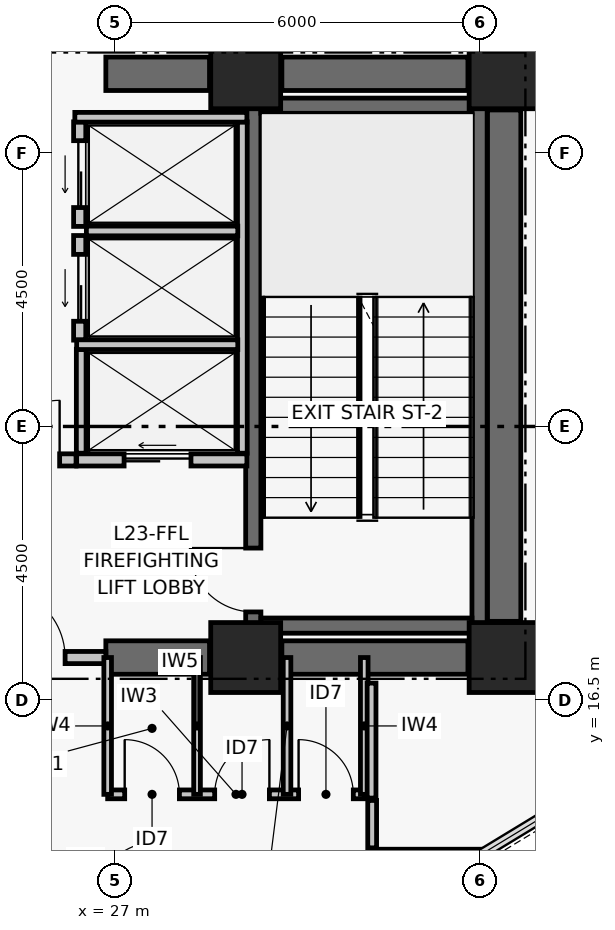
"""IFC4 building model, lengths in metres.
Left out: names, types, materials, properties, quantities, classifications, styles, units other than length and angle.
Written with IfcOpenShell. Run it as: python <this file> out.ifc"""

import sys

from ifc_helpers import new_model, si_unit, direction, frame, frame_2d, origin, origin_2d, place, context, subcontext, project, spatial, rectangle, extrude, element, fill, save


model = new_model("IFC4")
c1 = context("Model", 3, precision=1e-05, world=origin(), true_north=direction((0.0, 1.0)))
c2 = subcontext(c1, "Body", "Model", "MODEL_VIEW")
j1 = project(units=[si_unit("LENGTHUNIT", "METRE"), si_unit("PLANEANGLEUNIT", "RADIAN")], contexts=[c1])
p1 = place(None, origin())
s1 = spatial("IfcSite", under=j1, at=p1, CompositionType="ELEMENT")
p2 = place(p1, origin())
s2 = spatial("IfcBuilding", under=s1, at=p2, CompositionType="ELEMENT")
p3 = place(p2, frame((0.0, 0.0, 96.54)))
s3 = spatial("IfcBuildingStorey", under=s2, at=p3, CompositionType="ELEMENT", Elevation=96.54)
for number, where, z_axis, x_axis in (
    (1, (29.15, 17.2, 0.0), (0.0, 0.0, 1.0), (1.0, 0.0, 0.0)),
    (2, (33.4, 17.2, 0.0), (0.0, 0.0, 1.0), (1.0, 0.0, 0.0)),
    (3, (29.15, 26.8, 0.0), (0.0, 0.0, 1.0), (1.0, 0.0, 0.0)),
    (4, (33.4, 26.8, 0.0), (0.0, 0.0, 1.0), (1.0, 0.0, 0.0)),
):
    element("IfcColumn", number, at=place(p3, frame(where, z_axis=z_axis, x_axis=x_axis)), inside=s3, PredefinedType="COLUMN", context=c2, shape_type="SweptSolid", body=[
        extrude(rectangle(XDim=1.15, YDim=1.15, at=origin_2d()), origin(), (0.0, 0.0, 1.0), 3.72),
    ])
p4 = place(p3, frame((26.85, 17.2, 0.0), z_axis=(0.0, 0.0, 1.0), x_axis=(1.0, 0.0, 0.0)))
e5 = element("IfcWall", 5, at=p4, inside=s3, PredefinedType="SHEAR", context=c2, shape_type="SweptSolid", body=[
    extrude(rectangle(XDim=1.705, YDim=0.55, at=frame_2d((0.853, 0.0))), origin(), (0.0, 0.0, 1.0), 3.47),
])
p5 = place(p3, frame((29.745, 17.2, 0.0), z_axis=(0.0, 0.0, 1.0), x_axis=(1.0, 0.0, 0.0)))
e6 = element("IfcWall", 6, at=p5, inside=s3, PredefinedType="SHEAR", context=c2, shape_type="SweptSolid", body=[
    extrude(rectangle(XDim=3.06, YDim=0.55, at=frame_2d((1.53, 0.0))), origin(), (0.0, 0.0, 1.0), 3.47),
])
p6 = place(p3, frame((26.85, 26.8, 0.0), z_axis=(0.0, 0.0, 1.0), x_axis=(1.0, 0.0, 0.0)))
e7 = element("IfcWall", 7, at=p6, inside=s3, PredefinedType="SHEAR", context=c2, shape_type="SweptSolid", body=[
    extrude(rectangle(XDim=1.705, YDim=0.55, at=frame_2d((0.853, 0.0))), origin(), (0.0, 0.0, 1.0), 3.47),
])
p7 = place(p3, frame((29.745, 26.8, 0.0), z_axis=(0.0, 0.0, 1.0), x_axis=(1.0, 0.0, 0.0)))
e8 = element("IfcWall", 8, at=p7, inside=s3, PredefinedType="SHEAR", context=c2, shape_type="SweptSolid", body=[
    extrude(rectangle(XDim=3.06, YDim=0.55, at=frame_2d((1.53, 0.0))), origin(), (0.0, 0.0, 1.0), 3.47),
])
p8 = place(p3, frame((33.4, 17.795, 0.0), z_axis=(0.0, 0.0, 1.0), x_axis=(0.0, 1.0, 0.0)))
e9 = element("IfcWall", 9, at=p8, inside=s3, PredefinedType="SHEAR", context=c2, shape_type="SweptSolid", body=[
    extrude(rectangle(XDim=8.41, YDim=0.55, at=frame_2d((4.205, 0.0))), origin(), (0.0, 0.0, 1.0), 3.47),
])
p9 = place(p3, frame((29.275, 17.6, 0.0), z_axis=(0.0, 0.0, 1.0), x_axis=(0.0, 1.0, 0.0)))
e10 = element("IfcWall", 10, at=p9, inside=s3, PredefinedType="SHEAR", context=c2, shape_type="SweptSolid", body=[
    extrude(rectangle(XDim=8.8, YDim=0.25, at=frame_2d((4.4, 0.0))), origin(), (0.0, 0.0, 1.0), 3.47),
])
p10 = place(p9, frame((0.35, 0.0, 0.0)))
e11 = element("IfcOpeningElement", 11, at=p10, cuts=e10, PredefinedType="OPENING", context=c2, shape_type="SweptSolid", body=[
    extrude(rectangle(XDim=1.05, YDim=2.08, at=frame_2d((0.525, 1.04))), frame((0.0, 0.135, 0.0), z_axis=(0.0, -1.0, 0.0), x_axis=(1.0, 0.0, 0.0)), (0.0, 0.0, 1.0), 0.27),
])
p11 = place(p3, frame((32.996, 17.6, 0.0), z_axis=(0.0, 0.0, 1.0), x_axis=(0.0, 1.0, 0.0)))
e12 = element("IfcWall", 12, at=p11, inside=s3, PredefinedType="SHEAR", context=c2, shape_type="SweptSolid", body=[
    extrude(rectangle(XDim=8.8, YDim=0.25, at=frame_2d((4.4, 0.0))), origin(), (0.0, 0.0, 1.0), 3.47),
])
for number, where, z_axis, x_axis in (
    (13, (29.4, 17.725, 0.0), (0.0, 0.0, 1.0), (1.0, 0.0, 0.0)),
    (14, (29.4, 26.275, 0.0), (0.0, 0.0, 1.0), (1.0, 0.0, 0.0)),
):
    element("IfcWall", number, at=place(p3, frame(where, z_axis=z_axis, x_axis=x_axis)), inside=s3, PredefinedType="SHEAR", context=c2, shape_type="SweptSolid", body=[
        extrude(rectangle(XDim=3.471, YDim=0.25, at=frame_2d((1.736, 0.0))), origin(), (0.0, 0.0, 1.0), 3.47),
    ])
p12 = place(p3, frame((24.35, 17.2, 0.0), z_axis=(0.0, 0.0, 1.0), x_axis=(1.0, 0.0, 0.0)))
e15 = element("IfcWall", 15, at=p12, inside=s3, PredefinedType="PARTITIONING", context=c2, shape_type="SweptSolid", body=[
    extrude(rectangle(XDim=2.5, YDim=0.2, at=frame_2d((1.25, 0.0))), origin(), (0.0, 0.0, 1.0), 2.6),
])
p13 = place(p12, frame((0.68, 0.0, 0.0)))
e16 = element("IfcOpeningElement", 16, at=p13, cuts=e15, PredefinedType="OPENING", context=c2, shape_type="SweptSolid", body=[
    extrude(rectangle(XDim=1.15, YDim=2.08, at=frame_2d((0.575, 1.04))), frame((0.0, 0.11, 0.0), z_axis=(0.0, -1.0, 0.0), x_axis=(1.0, 0.0, 0.0)), (0.0, 0.0, 1.0), 0.22),
])
p14 = place(p3, frame((24.84, 20.45, 0.0), z_axis=(0.0, 0.0, 1.0), x_axis=(1.0, 0.0, 0.0)))
e17 = element("IfcWall", 17, at=p14, inside=s3, PredefinedType="PARTITIONING", context=c2, shape_type="SweptSolid", body=[
    extrude(rectangle(XDim=1.52, YDim=0.2, at=frame_2d((0.76, 0.0))), origin(), (0.0, 0.0, 1.0), 3.47),
])
p15 = place(p14, frame((0.27, 0.0, 0.0)))
e18 = element("IfcOpeningElement", 18, at=p15, cuts=e17, PredefinedType="OPENING", context=c2, shape_type="SweptSolid", body=[
    extrude(rectangle(XDim=0.98, YDim=2.06, at=frame_2d((0.49, 1.03))), frame((0.0, 0.11, 0.0), z_axis=(0.0, -1.0, 0.0), x_axis=(1.0, 0.0, 0.0)), (0.0, 0.0, 1.0), 0.22),
])
p16 = place(p3, frame((26.37, 20.45, 0.0), z_axis=(0.0, 0.0, 1.0), x_axis=(1.0, 0.0, 0.0)))
e19 = element("IfcWall", 19, at=p16, inside=s3, PredefinedType="PARTITIONING", context=c2, shape_type="SweptSolid", body=[
    extrude(rectangle(XDim=2.8, YDim=0.2, at=frame_2d((1.4, 0.0))), origin(), (0.0, 0.0, 1.0), 3.47),
])
p17 = place(p16, frame((0.78, 0.0, 0.0)))
e20 = element("IfcOpeningElement", 20, at=p17, cuts=e19, PredefinedType="OPENING", context=c2, shape_type="SweptSolid", body=[
    extrude(rectangle(XDim=1.1, YDim=2.08, at=frame_2d((0.55, 1.04))), frame((0.0, 0.11, 0.0), z_axis=(0.0, -1.0, 0.0), x_axis=(1.0, 0.0, 0.0)), (0.0, 0.0, 1.0), 0.22),
])
p18 = place(p3, frame((26.42, 22.42, 0.0), z_axis=(0.0, 0.0, 1.0), x_axis=(0.0, 1.0, 0.0)))
e21 = element("IfcWall", 21, at=p18, inside=s3, PredefinedType="PARTITIONING", context=c2, shape_type="SweptSolid", body=[
    extrude(rectangle(XDim=1.72, YDim=0.2, at=frame_2d((0.86, 0.0))), origin(), (0.0, 0.0, 1.0), 3.47),
])
p19 = place(p18, frame((0.31, 0.0, 0.0)))
e22 = element("IfcOpeningElement", 22, at=p19, cuts=e21, PredefinedType="OPENING", context=c2, shape_type="SweptSolid", body=[
    extrude(rectangle(XDim=1.1, YDim=2.08, at=frame_2d((0.55, 1.04))), frame((0.0, 0.11, 0.0), z_axis=(0.0, -1.0, 0.0), x_axis=(1.0, 0.0, 0.0)), (0.0, 0.0, 1.0), 0.22),
])
p20 = place(p3, frame((26.42, 24.29, 0.0), z_axis=(0.0, 0.0, 1.0), x_axis=(0.0, 1.0, 0.0)))
e23 = element("IfcWall", 23, at=p20, inside=s3, PredefinedType="PARTITIONING", context=c2, shape_type="SweptSolid", body=[
    extrude(rectangle(XDim=1.72, YDim=0.2, at=frame_2d((0.86, 0.0))), origin(), (0.0, 0.0, 1.0), 3.47),
])
p21 = place(p20, frame((0.31, 0.0, 0.0)))
e24 = element("IfcOpeningElement", 24, at=p21, cuts=e23, PredefinedType="OPENING", context=c2, shape_type="SweptSolid", body=[
    extrude(rectangle(XDim=1.1, YDim=2.08, at=frame_2d((0.55, 1.04))), frame((0.0, 0.11, 0.0), z_axis=(0.0, -1.0, 0.0), x_axis=(1.0, 0.0, 0.0)), (0.0, 0.0, 1.0), 0.22),
])
p22 = place(p3, frame((29.095, 20.56, 0.0), z_axis=(0.0, 0.0, 1.0), x_axis=(0.0, 1.0, 0.0)))
e25 = element("IfcWall", 25, at=p22, inside=s3, PredefinedType="PARTITIONING", context=c2, shape_type="SweptSolid", body=[
    extrude(rectangle(XDim=5.45, YDim=0.16, at=frame_2d((2.725, 0.0))), origin(), (0.0, 0.0, 1.0), 3.47),
])
p23 = place(p3, frame((26.445, 20.56, 0.0), z_axis=(0.0, 0.0, 1.0), x_axis=(0.0, 1.0, 0.0)))
e26 = element("IfcWall", 26, at=p23, inside=s3, PredefinedType="PARTITIONING", context=c2, shape_type="SweptSolid", body=[
    extrude(rectangle(XDim=1.71, YDim=0.16, at=frame_2d((0.855, 0.0))), origin(), (0.0, 0.0, 1.0), 3.47),
])
p24 = place(p3, frame((26.37, 22.345, 0.0), z_axis=(0.0, 0.0, 1.0), x_axis=(1.0, 0.0, 0.0)))
e27 = element("IfcWall", 27, at=p24, inside=s3, PredefinedType="PARTITIONING", context=c2, shape_type="SweptSolid", body=[
    extrude(rectangle(XDim=2.65, YDim=0.16, at=frame_2d((1.325, 0.0))), origin(), (0.0, 0.0, 1.0), 3.47),
])
p25 = place(p3, frame((26.53, 24.215, 0.0), z_axis=(0.0, 0.0, 1.0), x_axis=(1.0, 0.0, 0.0)))
e28 = element("IfcWall", 28, at=p25, inside=s3, PredefinedType="PARTITIONING", context=c2, shape_type="SweptSolid", body=[
    extrude(rectangle(XDim=2.49, YDim=0.16, at=frame_2d((1.245, 0.0))), origin(), (0.0, 0.0, 1.0), 3.47),
])
p26 = place(p3, frame((26.34, 26.085, 0.0), z_axis=(0.0, 0.0, 1.0), x_axis=(1.0, 0.0, 0.0)))
e29 = element("IfcWall", 29, at=p26, inside=s3, PredefinedType="PARTITIONING", context=c2, shape_type="SweptSolid", body=[
    extrude(rectangle(XDim=2.83, YDim=0.16, at=frame_2d((1.415, 0.0))), origin(), (0.0, 0.0, 1.0), 3.47),
])
p27 = place(p3, frame((26.88, 14.95, 0.0), z_axis=(0.0, 0.0, 1.0), x_axis=(1.0, 0.0, 0.0)))
e30 = element("IfcWall", 30, at=p27, inside=s3, PredefinedType="PARTITIONING", context=c2, shape_type="SweptSolid", body=[
    extrude(rectangle(XDim=4.22, YDim=0.145, at=frame_2d((2.11, 0.0))), origin(), (0.0, 0.0, 1.0), 3.05),
])
p28 = place(p27, frame((0.28, 0.0, 0.0)))
e31 = element("IfcOpeningElement", 31, at=p28, cuts=e30, PredefinedType="OPENING", context=c2, shape_type="SweptSolid", body=[
    extrude(rectangle(XDim=0.9, YDim=2.02, at=frame_2d((0.45, 1.01))), frame((0.0, 0.083, 0.0), z_axis=(0.0, -1.0, 0.0), x_axis=(1.0, 0.0, 0.0)), (0.0, 0.0, 1.0), 0.165),
])
p29 = place(p27, frame((1.76, 0.0, 0.0)))
e32 = element("IfcOpeningElement", 32, at=p29, cuts=e30, PredefinedType="OPENING", context=c2, shape_type="SweptSolid", body=[
    extrude(rectangle(XDim=0.9, YDim=2.02, at=frame_2d((0.45, 1.01))), frame((0.0, 0.083, 0.0), z_axis=(0.0, -1.0, 0.0), x_axis=(1.0, 0.0, 0.0)), (0.0, 0.0, 1.0), 0.165),
])
p30 = place(p27, frame((3.14, 0.0, 0.0)))
e33 = element("IfcOpeningElement", 33, at=p30, cuts=e30, PredefinedType="OPENING", context=c2, shape_type="SweptSolid", body=[
    extrude(rectangle(XDim=0.9, YDim=2.02, at=frame_2d((0.45, 1.01))), frame((0.0, 0.083, 0.0), z_axis=(0.0, -1.0, 0.0), x_axis=(1.0, 0.0, 0.0)), (0.0, 0.0, 1.0), 0.165),
])
p31 = place(p3, frame((26.88, 14.95, 0.0), z_axis=(0.0, 0.0, 1.0), x_axis=(0.0, 1.0, 0.0)))
e34 = element("IfcWall", 34, at=p31, inside=s3, PredefinedType="PARTITIONING", context=c2, shape_type="SweptSolid", body=[
    extrude(rectangle(XDim=2.25, YDim=0.125, at=frame_2d((1.125, 0.0))), origin(), (0.0, 0.0, 1.0), 2.6),
])
p32 = place(p3, frame((28.35, 14.95, 0.0), z_axis=(0.0, 0.0, 1.0), x_axis=(0.0, 1.0, 0.0)))
e35 = element("IfcWall", 35, at=p32, inside=s3, PredefinedType="PARTITIONING", context=c2, shape_type="SweptSolid", body=[
    extrude(rectangle(XDim=2.25, YDim=0.11, at=frame_2d((1.125, 0.0))), origin(), (0.0, 0.0, 1.0), 2.6),
])
for number, where, z_axis, x_axis in (
    (36, (29.83, 14.95, 0.0), (0.0, 0.0, 1.0), (0.0, 1.0, 0.0)),
    (37, (31.1, 14.95, 0.0), (0.0, 0.0, 1.0), (0.0, 1.0, 0.0)),
):
    element("IfcWall", number, at=place(p3, frame(where, z_axis=z_axis, x_axis=x_axis)), inside=s3, PredefinedType="PARTITIONING", context=c2, shape_type="SweptSolid", body=[
        extrude(rectangle(XDim=2.25, YDim=0.125, at=frame_2d((1.125, 0.0))), origin(), (0.0, 0.0, 1.0), 2.6),
    ])
p33 = place(p3, frame((31.23, 14.07, 0.0), z_axis=(0.0, 0.0, 1.0), x_axis=(0.0, 1.0, 0.0)))
e38 = element("IfcWall", 38, at=p33, inside=s3, PredefinedType="PARTITIONING", context=c2, shape_type="SweptSolid", body=[
    extrude(rectangle(XDim=0.78, YDim=0.145, at=frame_2d((0.39, 0.0))), origin(), (0.0, 0.0, 1.0), 2.85),
])
p34 = place(p3, frame((31.22, 14.889, 0.0), z_axis=(0.0, 0.0, 1.0), x_axis=(0.0, 1.0, 0.0)))
e39 = element("IfcWall", 39, at=p34, inside=s3, PredefinedType="PARTITIONING", context=c2, shape_type="SweptSolid", body=[
    extrude(rectangle(XDim=1.891, YDim=0.145, at=frame_2d((0.946, 0.0))), origin(), (0.0, 0.0, 1.0), 2.6),
])
p35 = place(p3, frame((33.74, 27.22, 0.0), z_axis=(0.0, 0.0, 1.0), x_axis=(-1.0, 0.0, 0.0)))
e40 = element("IfcWall", 40, at=p35, inside=s3, PredefinedType="PARTITIONING", context=c2, shape_type="SweptSolid", body=[
    extrude(rectangle(XDim=0.86, YDim=0.145, at=frame_2d((0.43, 0.0))), origin(), (0.0, 0.0, 1.0), 2.6),
])
p36 = place(p3, frame((31.18, 14.0, 0.0), z_axis=(0.0, 0.0, 1.0), x_axis=(1.0, 0.0, 0.0)))
e41 = element("IfcWall", 41, at=p36, inside=s3, PredefinedType="PARTITIONING", context=c2, shape_type="SweptSolid", body=[
    extrude(rectangle(XDim=1.924, YDim=0.095, at=frame_2d((0.962, 0.0))), origin(), (0.0, 0.0, 1.0), 3.47),
])
p37 = place(p10, origin())
e42 = element("IfcDoor", 42, at=p37, inside=s3, OperationType="SINGLE_SWING_RIGHT", PredefinedType="DOOR", context=c2, shape_type="SweptSolid", body=[
    extrude(rectangle(XDim=1.05, YDim=2.08, at=frame_2d((0.525, 1.04))), frame((0.0, 0.025, 0.0), z_axis=(0.0, -1.0, 0.0), x_axis=(1.0, 0.0, 0.0)), (0.0, 0.0, 1.0), 0.05),
])
fill(e11, e42)
p38 = place(p13, origin())
e43 = element("IfcDoor", 43, at=p38, inside=s3, OperationType="SINGLE_SWING_LEFT", PredefinedType="DOOR", context=c2, shape_type="SweptSolid", body=[
    extrude(rectangle(XDim=1.15, YDim=2.08, at=frame_2d((0.575, 1.04))), frame((0.0, 0.025, 0.0), z_axis=(0.0, -1.0, 0.0), x_axis=(1.0, 0.0, 0.0)), (0.0, 0.0, 1.0), 0.05),
])
fill(e16, e43)
p39 = place(p15, origin())
e44 = element("IfcDoor", 44, at=p39, inside=s3, OperationType="SINGLE_SWING_RIGHT", PredefinedType="DOOR", context=c2, shape_type="SweptSolid", body=[
    extrude(rectangle(XDim=0.98, YDim=2.06, at=frame_2d((0.49, 1.03))), frame((0.0, 0.025, 0.0), z_axis=(0.0, -1.0, 0.0), x_axis=(1.0, 0.0, 0.0)), (0.0, 0.0, 1.0), 0.05),
])
fill(e18, e44)
p40 = place(p17, origin())
e45 = element("IfcDoor", 45, at=p40, inside=s3, OperationType="DOUBLE_DOOR_SLIDING", PredefinedType="DOOR", context=c2, shape_type="SweptSolid", body=[
    extrude(rectangle(XDim=1.1, YDim=2.08, at=frame_2d((0.55, 1.04))), frame((0.0, 0.025, 0.0), z_axis=(0.0, -1.0, 0.0), x_axis=(1.0, 0.0, 0.0)), (0.0, 0.0, 1.0), 0.05),
])
fill(e20, e45)
p41 = place(p19, origin())
e46 = element("IfcDoor", 46, at=p41, inside=s3, OperationType="DOUBLE_DOOR_SLIDING", PredefinedType="DOOR", context=c2, shape_type="SweptSolid", body=[
    extrude(rectangle(XDim=1.1, YDim=2.08, at=frame_2d((0.55, 1.04))), frame((0.0, 0.025, 0.0), z_axis=(0.0, -1.0, 0.0), x_axis=(1.0, 0.0, 0.0)), (0.0, 0.0, 1.0), 0.05),
])
fill(e22, e46)
p42 = place(p21, origin())
e47 = element("IfcDoor", 47, at=p42, inside=s3, OperationType="DOUBLE_DOOR_SLIDING", PredefinedType="DOOR", context=c2, shape_type="SweptSolid", body=[
    extrude(rectangle(XDim=1.1, YDim=2.08, at=frame_2d((0.55, 1.04))), frame((0.0, 0.025, 0.0), z_axis=(0.0, -1.0, 0.0), x_axis=(1.0, 0.0, 0.0)), (0.0, 0.0, 1.0), 0.05),
])
fill(e24, e47)
p43 = place(p28, origin())
e48 = element("IfcDoor", 48, at=p43, inside=s3, OperationType="SINGLE_SWING_LEFT", PredefinedType="DOOR", context=c2, shape_type="SweptSolid", body=[
    extrude(rectangle(XDim=0.9, YDim=2.02, at=frame_2d((0.45, 1.01))), frame((0.0, 0.025, 0.0), z_axis=(0.0, -1.0, 0.0), x_axis=(1.0, 0.0, 0.0)), (0.0, 0.0, 1.0), 0.05),
])
fill(e31, e48)
p44 = place(p29, origin())
e49 = element("IfcDoor", 49, at=p44, inside=s3, OperationType="SINGLE_SWING_RIGHT", PredefinedType="DOOR", context=c2, shape_type="SweptSolid", body=[
    extrude(rectangle(XDim=0.9, YDim=2.02, at=frame_2d((0.45, 1.01))), frame((0.0, 0.025, 0.0), z_axis=(0.0, -1.0, 0.0), x_axis=(1.0, 0.0, 0.0)), (0.0, 0.0, 1.0), 0.05),
])
fill(e32, e49)
p45 = place(p30, origin())
e50 = element("IfcDoor", 50, at=p45, inside=s3, OperationType="SINGLE_SWING_LEFT", PredefinedType="DOOR", context=c2, shape_type="SweptSolid", body=[
    extrude(rectangle(XDim=0.9, YDim=2.02, at=frame_2d((0.45, 1.01))), frame((0.0, 0.025, 0.0), z_axis=(0.0, -1.0, 0.0), x_axis=(1.0, 0.0, 0.0)), (0.0, 0.0, 1.0), 0.05),
])
fill(e33, e50)
save(model, sys.argv[1])
